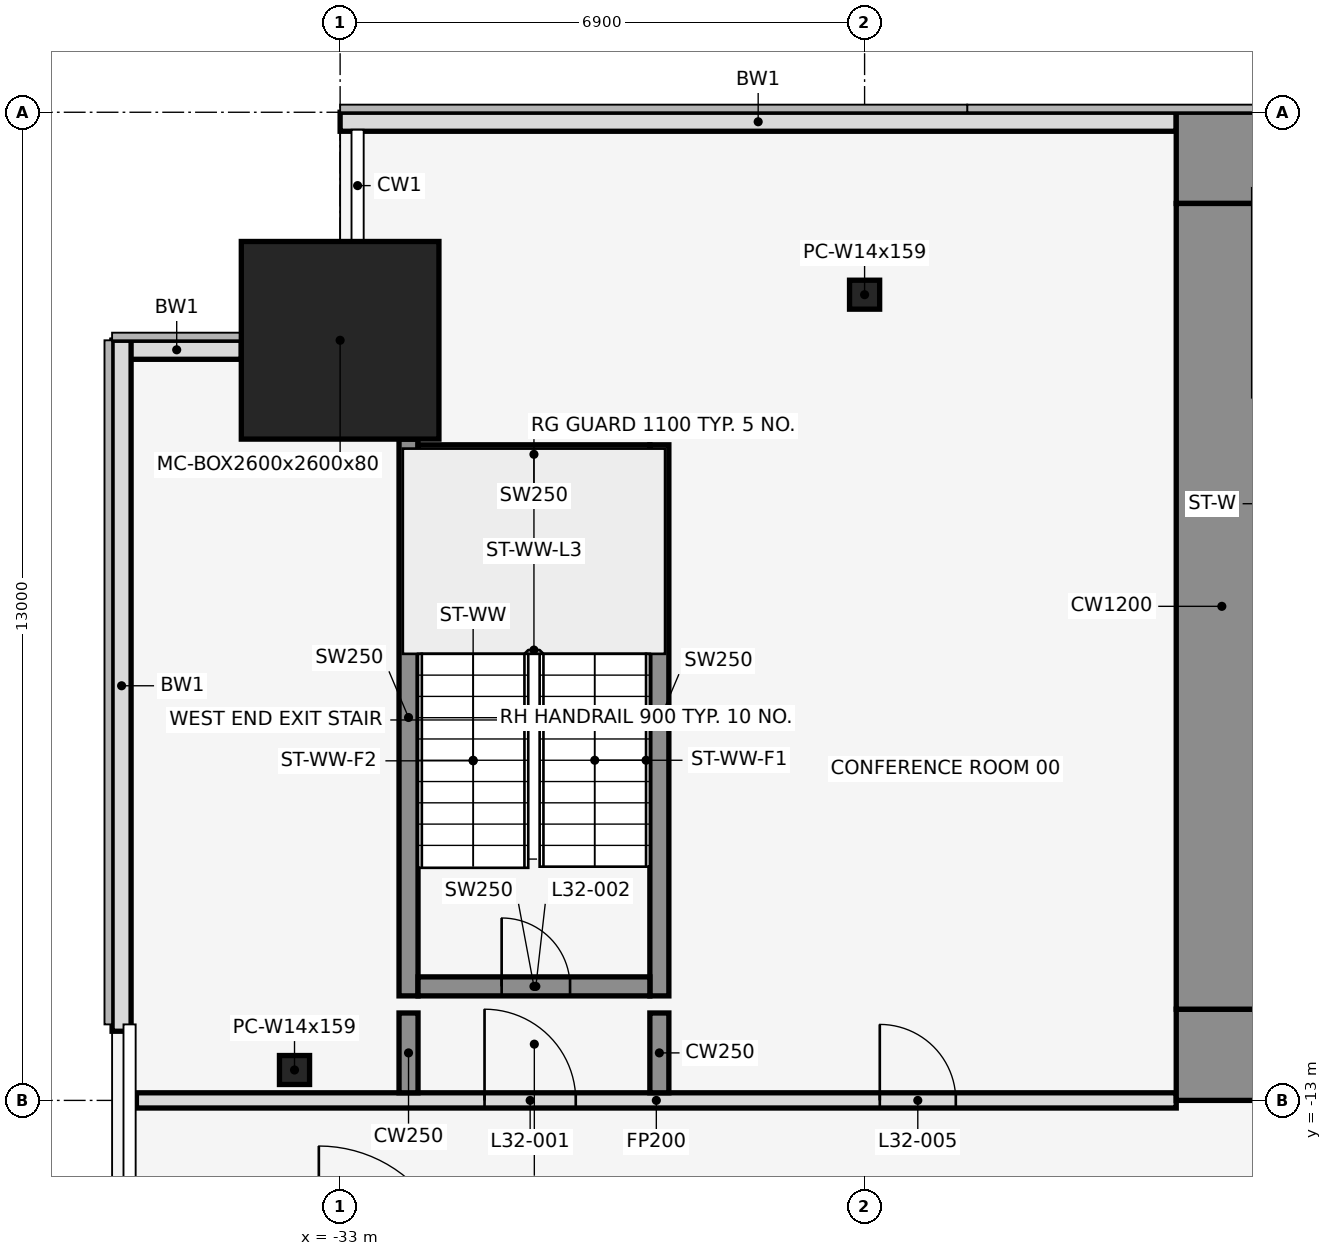
"""IFC4 building model, lengths in metres.
Left out: names, types, materials, properties, quantities, classifications, styles, units other than length and angle.
Written with IfcOpenShell. Run it as: python <this file> out.ifc"""

import sys

from ifc_helpers import new_model, si_unit, direction, frame, frame_2d, origin, origin_2d, place, context, subcontext, project, spatial, rectangle, hollow_rectangle, i_section, extrude, element, fill, save


model = new_model("IFC4")
c1 = context("Model", 3, precision=1e-05, world=origin(), true_north=direction((0.0, 1.0)))
c2 = subcontext(c1, "Body", "Model", "MODEL_VIEW")
j1 = project(units=[si_unit("LENGTHUNIT", "METRE"), si_unit("PLANEANGLEUNIT", "RADIAN")], contexts=[c1])
p1 = place(None, origin())
s1 = spatial("IfcSite", under=j1, at=p1, CompositionType="ELEMENT")
p2 = place(p1, origin())
s2 = spatial("IfcBuilding", under=s1, at=p2, CompositionType="ELEMENT")
p3 = place(p2, frame((0.0, 0.0, 148.6)))
s3 = spatial("IfcBuildingStorey", under=s2, at=p3, CompositionType="ELEMENT", Elevation=148.6)
p4 = place(p3, frame((-33.0, -3.0, 0.0), z_axis=(0.0, 0.0, 1.0), x_axis=(1.0, 0.0, 0.0)))
e1 = element("IfcColumn", 1, at=p4, inside=s3, PredefinedType="COLUMN", context=c2, shape_type="SweptSolid", body=[
    extrude(hollow_rectangle(XDim=2.6, YDim=2.6, WallThickness=0.08, at=origin_2d()), origin(), (0.0, 0.0, 1.0), 4.1),
])
for number, where, z_axis, x_axis in (
    (2, (-26.1, -2.4, 0.0), (0.0, 0.0, 1.0), (1.0, 0.0, 0.0)),
    (3, (-33.6, -12.6, 0.0), (0.0, 0.0, 1.0), (1.0, 0.0, 0.0)),
):
    element("IfcColumn", number, at=place(p3, frame(where, z_axis=z_axis, x_axis=x_axis)), inside=s3, PredefinedType="COLUMN", context=c2, shape_type="SweptSolid", body=[
        extrude(i_section(OverallWidth=0.396, OverallDepth=0.381, WebThickness=0.019, FlangeThickness=0.03, at=origin_2d()), origin(), (0.0, 0.0, 1.0), 4.1),
    ])
p5 = place(p3, frame((-22.0, -0.125, 0.0), z_axis=(0.0, 0.0, 1.0), x_axis=(-1.0, 0.0, 0.0)))
e4 = element("IfcWall", 4, at=p5, inside=s3, PredefinedType="STANDARD", context=c2, shape_type="SweptSolid", body=[
    extrude(rectangle(XDim=11.0, YDim=0.25, at=frame_2d((5.5, 0.0))), origin(), (0.0, 0.0, 1.0), 3.95),
])
p6 = place(p3, frame((-34.3, -3.125, 0.0), z_axis=(0.0, 0.0, 1.0), x_axis=(-1.0, 0.0, 0.0)))
e5 = element("IfcWall", 5, at=p6, inside=s3, PredefinedType="STANDARD", context=c2, shape_type="SweptSolid", body=[
    extrude(rectangle(XDim=1.7, YDim=0.25, at=frame_2d((0.85, 0.0))), origin(), (0.0, 0.0, 1.0), 3.95),
])
p7 = place(p3, frame((-35.875, -3.0, 0.0), z_axis=(0.0, 0.0, 1.0), x_axis=(0.0, -1.0, 0.0)))
e6 = element("IfcWall", 6, at=p7, inside=s3, PredefinedType="STANDARD", context=c2, shape_type="SweptSolid", body=[
    extrude(rectangle(XDim=9.09, YDim=0.25, at=frame_2d((4.545, 0.0))), origin(), (0.0, 0.0, 1.0), 3.95),
])
p8 = place(p3, frame((-32.1, -11.625, 0.0), z_axis=(0.0, 0.0, 1.0), x_axis=(0.0, 1.0, 0.0)))
e7 = element("IfcWall", 7, at=p8, inside=s3, PredefinedType="SHEAR", context=c2, shape_type="SweptSolid", body=[
    extrude(rectangle(XDim=7.325, YDim=0.25, at=frame_2d((3.663, 0.0))), origin(), (0.0, 0.0, 1.0), 4.1),
])
p9 = place(p3, frame((-28.8, -11.625, 0.0), z_axis=(0.0, 0.0, 1.0), x_axis=(0.0, 1.0, 0.0)))
e8 = element("IfcWall", 8, at=p9, inside=s3, PredefinedType="SHEAR", context=c2, shape_type="SweptSolid", body=[
    extrude(rectangle(XDim=7.25, YDim=0.25, at=frame_2d((3.625, 0.0))), origin(), (0.0, 0.0, 1.0), 4.1),
])
p10 = place(p3, frame((-31.975, -11.5, 0.0), z_axis=(0.0, 0.0, 1.0), x_axis=(1.0, 0.0, 0.0)))
e9 = element("IfcWall", 9, at=p10, inside=s3, PredefinedType="SHEAR", context=c2, shape_type="SweptSolid", body=[
    extrude(rectangle(XDim=3.05, YDim=0.25, at=frame_2d((1.525, 0.0))), origin(), (0.0, 0.0, 1.0), 4.1),
])
p11 = place(p10, frame((1.1, 0.0, 0.0)))
e10 = element("IfcOpeningElement", 10, at=p11, cuts=e9, PredefinedType="OPENING", context=c2, shape_type="SweptSolid", body=[
    extrude(rectangle(XDim=0.9, YDim=2.1, at=frame_2d((0.45, 1.05))), frame((0.0, 0.137, 0.0), z_axis=(0.0, -1.0, 0.0), x_axis=(1.0, 0.0, 0.0)), (0.0, 0.0, 1.0), 0.274),
])
p12 = place(p3, frame((-31.975, -4.5, 0.0), z_axis=(0.0, 0.0, 1.0), x_axis=(1.0, 0.0, 0.0)))
e11 = element("IfcWall", 11, at=p12, inside=s3, PredefinedType="SHEAR", context=c2, shape_type="SweptSolid", body=[
    extrude(rectangle(XDim=3.05, YDim=0.25, at=frame_2d((1.525, 0.0))), origin(), (0.0, 0.0, 1.0), 4.1),
])
p13 = place(p3, frame((-35.68, -13.0, 0.0), z_axis=(0.0, 0.0, 1.0), x_axis=(1.0, 0.0, 0.0)))
e12 = element("IfcWall", 12, at=p13, inside=s3, PredefinedType="PARTITIONING", context=c2, shape_type="SweptSolid", body=[
    extrude(rectangle(XDim=13.68, YDim=0.2, at=frame_2d((6.84, 0.0))), origin(), (0.0, 0.0, 1.0), 2.84),
])
p14 = place(p13, frame((4.58, 0.0, 0.0)))
e13 = element("IfcOpeningElement", 13, at=p14, cuts=e12, PredefinedType="OPENING", context=c2, shape_type="SweptSolid", body=[
    extrude(rectangle(XDim=1.2, YDim=2.1, at=frame_2d((0.6, 1.05))), frame((0.0, 0.112, 0.0), z_axis=(0.0, -1.0, 0.0), x_axis=(1.0, 0.0, 0.0)), (0.0, 0.0, 1.0), 0.224),
])
p15 = place(p13, frame((9.78, 0.0, 0.0)))
e14 = element("IfcOpeningElement", 14, at=p15, cuts=e12, PredefinedType="OPENING", context=c2, shape_type="SweptSolid", body=[
    extrude(rectangle(XDim=1.0, YDim=2.1, at=frame_2d((0.5, 1.05))), frame((0.0, 0.112, 0.0), z_axis=(0.0, -1.0, 0.0), x_axis=(1.0, 0.0, 0.0)), (0.0, 0.0, 1.0), 0.224),
])
for number, where, z_axis, x_axis in (
    (15, (-32.1, -12.9, 0.0), (0.0, 0.0, 1.0), (0.0, 1.0, 0.0)),
    (16, (-28.8, -12.9, 0.0), (0.0, 0.0, 1.0), (0.0, 1.0, 0.0)),
):
    element("IfcWall", number, at=place(p3, frame(where, z_axis=z_axis, x_axis=x_axis)), inside=s3, PredefinedType="SHEAR", context=c2, shape_type="SweptSolid", body=[
        extrude(rectangle(XDim=1.05, YDim=0.25, at=frame_2d((0.525, 0.0))), origin(), (0.0, 0.0, 1.0), 4.1),
    ])
p16 = place(p3, frame((-22.0, -0.6, 0.0), z_axis=(0.0, 0.0, 1.0), x_axis=(1.0, 0.0, 0.0)))
e17 = element("IfcWall", 17, at=p16, inside=s3, PredefinedType="SHEAR", context=c2, shape_type="SweptSolid", body=[
    extrude(rectangle(XDim=44.0, YDim=1.2, at=frame_2d((22.0, 0.0))), origin(), (0.0, 0.0, 1.0), 4.1),
])
p17 = place(p16, frame((18.55, 0.0, 0.0)))
e18 = element("IfcOpeningElement", 18, at=p17, cuts=e17, PredefinedType="OPENING", context=c2, shape_type="SweptSolid", body=[
    extrude(rectangle(XDim=0.9, YDim=2.1, at=frame_2d((0.45, 1.05))), frame((0.0, 0.612, 0.0), z_axis=(0.0, -1.0, 0.0), x_axis=(1.0, 0.0, 0.0)), (0.0, 0.0, 1.0), 1.224),
])
p18 = place(p16, frame((24.55, 0.0, 0.0)))
e19 = element("IfcOpeningElement", 19, at=p18, cuts=e17, PredefinedType="OPENING", context=c2, shape_type="SweptSolid", body=[
    extrude(rectangle(XDim=0.9, YDim=2.1, at=frame_2d((0.45, 1.05))), frame((0.0, 0.612, 0.0), z_axis=(0.0, -1.0, 0.0), x_axis=(1.0, 0.0, 0.0)), (0.0, 0.0, 1.0), 1.224),
])
p19 = place(p3, frame((-22.0, -12.4, 0.0), z_axis=(0.0, 0.0, 1.0), x_axis=(1.0, 0.0, 0.0)))
e20 = element("IfcWall", 20, at=p19, inside=s3, PredefinedType="SHEAR", context=c2, shape_type="SweptSolid", body=[
    extrude(rectangle(XDim=44.0, YDim=1.2, at=frame_2d((22.0, 0.0))), origin(), (0.0, 0.0, 1.0), 4.1),
])
p20 = place(p19, frame((2.2, 0.0, 0.0)))
e21 = element("IfcOpeningElement", 21, at=p20, cuts=e20, PredefinedType="OPENING", context=c2, shape_type="SweptSolid", body=[
    extrude(rectangle(XDim=1.2, YDim=2.1, at=frame_2d((0.6, 1.05))), frame((0.0, 0.612, 0.0), z_axis=(0.0, -1.0, 0.0), x_axis=(1.0, 0.0, 0.0)), (0.0, 0.0, 1.0), 1.224),
])
p21 = place(p19, frame((21.4, 0.0, 0.0)))
e22 = element("IfcOpeningElement", 22, at=p21, cuts=e20, PredefinedType="OPENING", context=c2, shape_type="SweptSolid", body=[
    extrude(rectangle(XDim=1.2, YDim=2.1, at=frame_2d((0.6, 1.05))), frame((0.0, 0.612, 0.0), z_axis=(0.0, -1.0, 0.0), x_axis=(1.0, 0.0, 0.0)), (0.0, 0.0, 1.0), 1.224),
])
p22 = place(p19, frame((40.6, 0.0, 0.0)))
e23 = element("IfcOpeningElement", 23, at=p22, cuts=e20, PredefinedType="OPENING", context=c2, shape_type="SweptSolid", body=[
    extrude(rectangle(XDim=1.2, YDim=2.1, at=frame_2d((0.6, 1.05))), frame((0.0, 0.612, 0.0), z_axis=(0.0, -1.0, 0.0), x_axis=(1.0, 0.0, 0.0)), (0.0, 0.0, 1.0), 1.224),
])
p23 = place(p19, frame((16.0, 0.0, 0.0)))
e24 = element("IfcOpeningElement", 24, at=p23, cuts=e20, PredefinedType="OPENING", context=c2, shape_type="SweptSolid", body=[
    extrude(rectangle(XDim=1.8, YDim=2.1, at=frame_2d((0.9, 1.05))), frame((0.0, 0.612, 0.0), z_axis=(0.0, -1.0, 0.0), x_axis=(1.0, 0.0, 0.0)), (0.0, 0.0, 1.0), 1.224),
])
p24 = place(p19, frame((6.3, 0.0, 0.0)))
e25 = element("IfcOpeningElement", 25, at=p24, cuts=e20, PredefinedType="OPENING", context=c2, shape_type="SweptSolid", body=[
    extrude(rectangle(XDim=1.2, YDim=2.1, at=frame_2d((0.6, 1.05))), frame((0.0, 0.612, 0.0), z_axis=(0.0, -1.0, 0.0), x_axis=(1.0, 0.0, 0.0)), (0.0, 0.0, 1.0), 1.224),
])
p25 = place(p19, frame((26.2, 0.0, 0.0)))
e26 = element("IfcOpeningElement", 26, at=p25, cuts=e20, PredefinedType="OPENING", context=c2, shape_type="SweptSolid", body=[
    extrude(rectangle(XDim=1.8, YDim=2.1, at=frame_2d((0.9, 1.05))), frame((0.0, 0.612, 0.0), z_axis=(0.0, -1.0, 0.0), x_axis=(1.0, 0.0, 0.0)), (0.0, 0.0, 1.0), 1.224),
])
p26 = place(p19, frame((36.5, 0.0, 0.0)))
e27 = element("IfcOpeningElement", 27, at=p26, cuts=e20, PredefinedType="OPENING", context=c2, shape_type="SweptSolid", body=[
    extrude(rectangle(XDim=1.2, YDim=2.1, at=frame_2d((0.6, 1.05))), frame((0.0, 0.612, 0.0), z_axis=(0.0, -1.0, 0.0), x_axis=(1.0, 0.0, 0.0)), (0.0, 0.0, 1.0), 1.224),
])
p27 = place(p3, frame((-21.4, -11.8, 0.0), z_axis=(0.0, 0.0, 1.0), x_axis=(0.0, 1.0, 0.0)))
e28 = element("IfcWall", 28, at=p27, inside=s3, PredefinedType="SHEAR", context=c2, shape_type="SweptSolid", body=[
    extrude(rectangle(XDim=10.6, YDim=1.2, at=frame_2d((5.3, 0.0))), origin(), (0.0, 0.0, 1.0), 4.1),
])
p28 = place(p14, origin())
e29 = element("IfcDoor", 29, at=p28, inside=s3, OperationType="SINGLE_SWING_LEFT", PredefinedType="DOOR", context=c2, shape_type="SweptSolid", body=[
    extrude(rectangle(XDim=1.2, YDim=2.1, at=frame_2d((0.6, 1.05))), frame((0.0, 0.025, 0.0), z_axis=(0.0, -1.0, 0.0), x_axis=(1.0, 0.0, 0.0)), (0.0, 0.0, 1.0), 0.05),
])
fill(e13, e29)
p29 = place(p11, origin())
e30 = element("IfcDoor", 30, at=p29, inside=s3, OperationType="SINGLE_SWING_LEFT", PredefinedType="DOOR", context=c2, shape_type="SweptSolid", body=[
    extrude(rectangle(XDim=0.9, YDim=2.1, at=frame_2d((0.45, 1.05))), frame((0.0, 0.025, 0.0), z_axis=(0.0, -1.0, 0.0), x_axis=(1.0, 0.0, 0.0)), (0.0, 0.0, 1.0), 0.05),
])
fill(e10, e30)
p30 = place(p15, origin())
e31 = element("IfcDoor", 31, at=p30, inside=s3, OperationType="SINGLE_SWING_LEFT", PredefinedType="DOOR", context=c2, shape_type="SweptSolid", body=[
    extrude(rectangle(XDim=1.0, YDim=2.1, at=frame_2d((0.5, 1.05))), frame((0.0, 0.025, 0.0), z_axis=(0.0, -1.0, 0.0), x_axis=(1.0, 0.0, 0.0)), (0.0, 0.0, 1.0), 0.05),
])
fill(e14, e31)
save(model, sys.argv[1])
